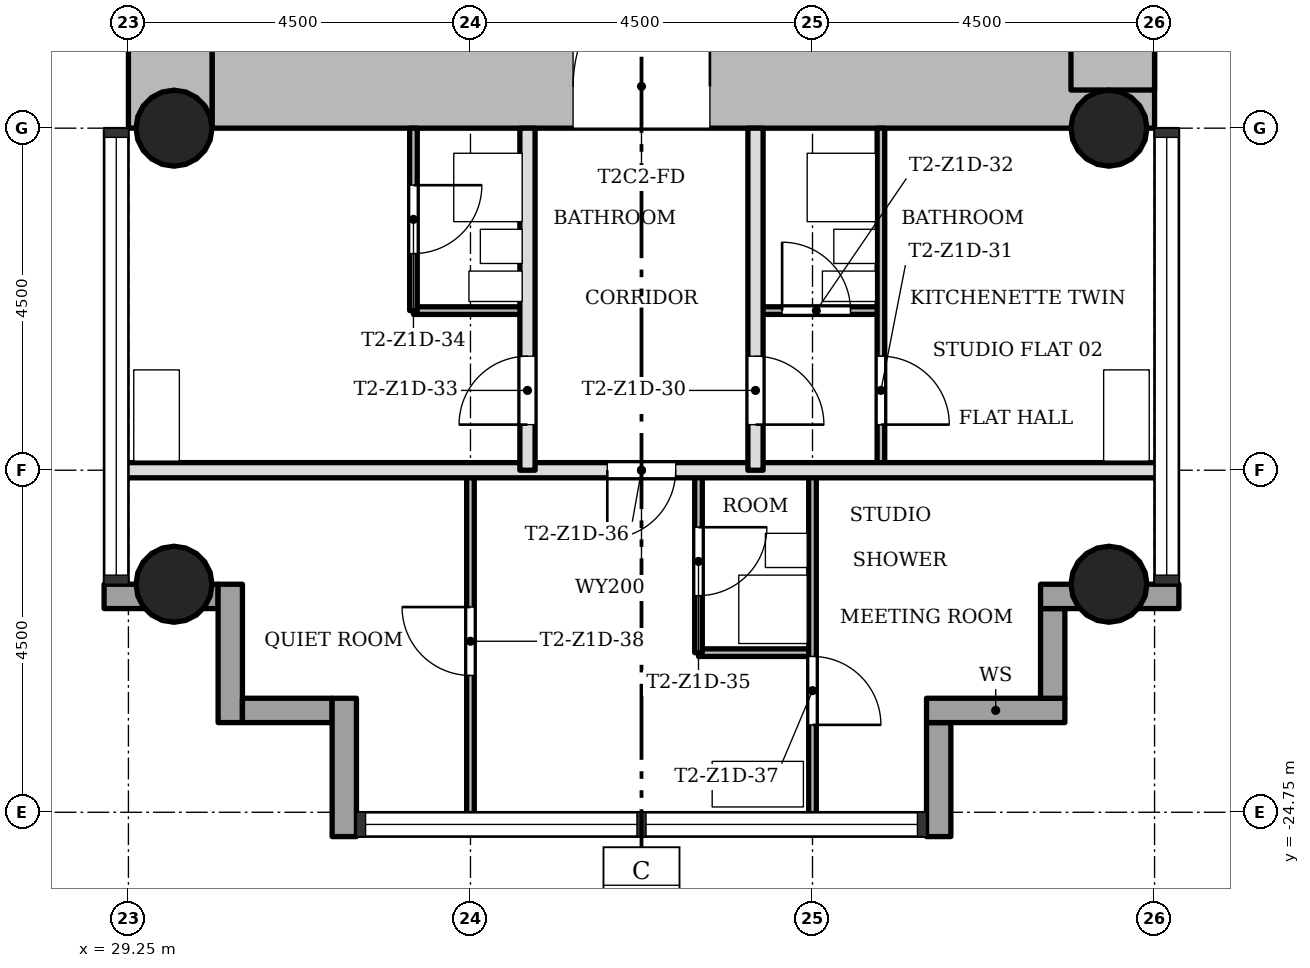
"""IFC4 building model, lengths in metres.
Left out: names, types, materials, properties, quantities, classifications, styles, units other than length and angle.
Written with IfcOpenShell. Run it as: python <this file> out.ifc"""

import sys

from ifc_helpers import new_model, si_unit, direction, frame, frame_2d, origin, origin_2d, place, context, subcontext, project, spatial, rectangle, hollow_circle, extrude, element, fill, save


model = new_model("IFC4")
c1 = context("Model", 3, precision=1e-05, world=origin(), true_north=direction((0.0, 1.0)))
c2 = subcontext(c1, "Body", "Model", "MODEL_VIEW")
j1 = project(units=[si_unit("LENGTHUNIT", "METRE"), si_unit("PLANEANGLEUNIT", "RADIAN")], contexts=[c1])
p1 = place(None, origin())
s1 = spatial("IfcSite", under=j1, at=p1, CompositionType="ELEMENT")
p2 = place(p1, origin())
s2 = spatial("IfcBuilding", under=s1, at=p2, CompositionType="ELEMENT")
p3 = place(p2, frame((0.0, 0.0, 55.1)))
s3 = spatial("IfcBuildingStorey", under=s2, at=p3, CompositionType="ELEMENT", Elevation=55.1)
p4 = place(p3, frame((30.35, -15.2, 0.0), z_axis=(0.0, 0.0, 1.0), x_axis=(1.0, 0.0, 0.0)))
e1 = element("IfcWall", 1, at=p4, inside=s3, PredefinedType="SHEAR", context=c2, shape_type="SweptSolid", body=[
    extrude(rectangle(XDim=12.4, YDim=1.1, at=frame_2d((6.2, 0.0))), origin(), (0.0, 0.0, 1.0), 3.4),
])
p5 = place(p4, frame((4.75, 0.0, 0.0)))
e2 = element("IfcOpeningElement", 2, at=p5, cuts=e1, PredefinedType="OPENING", context=c2, shape_type="SweptSolid", body=[
    extrude(rectangle(XDim=1.8, YDim=2.1, at=frame_2d((0.9, 1.05))), frame((0.0, 0.56, 0.0), z_axis=(0.0, -1.0, 0.0), x_axis=(1.0, 0.0, 0.0)), (0.0, 0.0, 1.0), 1.12),
])
p6 = place(p3, frame((42.2, -15.248, 0.0), z_axis=(0.0, 0.0, 1.0), x_axis=(0.0, 1.0, 0.0)))
e3 = element("IfcWall", 3, at=p6, inside=s3, PredefinedType="SHEAR", context=c2, shape_type="SweptSolid", body=[
    extrude(rectangle(XDim=8.596, YDim=1.1, at=frame_2d((4.298, 0.0))), origin(), (0.0, 0.0, 1.0), 3.4),
])
p7 = place(p3, frame((29.8, -7.85, 0.0), z_axis=(0.0, 0.0, 1.0), x_axis=(0.0, -1.0, 0.0)))
e4 = element("IfcWall", 4, at=p7, inside=s3, PredefinedType="SHEAR", context=c2, shape_type="SweptSolid", body=[
    extrude(rectangle(XDim=7.9, YDim=1.1, at=frame_2d((3.95, 0.0))), origin(), (0.0, 0.0, 1.0), 3.4),
])
for number, where, z_axis, x_axis in (
    (5, (42.15, -15.75, 0.0), (0.0, 0.0, 1.0), (1.0, 0.0, 0.0)),
    (6, (29.85, -15.75, 0.0), (0.0, 0.0, 1.0), (1.0, 0.0, 0.0)),
    (7, (42.15, -21.75, 0.0), (0.0, 0.0, 1.0), (1.0, 0.0, 0.0)),
    (8, (29.85, -21.75, 0.0), (0.0, 0.0, 1.0), (1.0, 0.0, 0.0)),
):
    element("IfcColumn", number, at=place(p3, frame(where, z_axis=z_axis, x_axis=x_axis)), inside=s3, PredefinedType="COLUMN", context=c2, shape_type="SweptSolid", body=[
        extrude(hollow_circle(Radius=0.5, WallThickness=0.036, at=origin_2d()), origin(), (0.0, 0.0, 1.0), 3.4),
    ])
p8 = place(p3, frame((39.91, -25.07, -0.3), z_axis=(0.0, 0.0, 1.0), x_axis=(0.0, 1.0, 0.0)))
e9 = element("IfcWall", 9, at=p8, inside=s3, PredefinedType="STANDARD", context=c2, shape_type="SweptSolid", body=[
    extrude(rectangle(XDim=1.5, YDim=0.32, at=frame_2d((0.75, 0.0))), origin(), (0.0, 0.0, 1.0), 3.4),
])
p9 = place(p3, frame((39.75, -23.41, -0.3), z_axis=(0.0, 0.0, 1.0), x_axis=(1.0, 0.0, 0.0)))
e10 = element("IfcWall", 10, at=p9, inside=s3, PredefinedType="STANDARD", context=c2, shape_type="SweptSolid", body=[
    extrude(rectangle(XDim=1.82, YDim=0.32, at=frame_2d((0.91, 0.0))), origin(), (0.0, 0.0, 1.0), 3.4),
])
p10 = place(p3, frame((41.41, -23.25, -0.3), z_axis=(0.0, 0.0, 1.0), x_axis=(0.0, 1.0, 0.0)))
e11 = element("IfcWall", 11, at=p10, inside=s3, PredefinedType="STANDARD", context=c2, shape_type="SweptSolid", body=[
    extrude(rectangle(XDim=1.18, YDim=0.32, at=frame_2d((0.59, 0.0))), origin(), (0.0, 0.0, 1.0), 3.4),
])
p11 = place(p3, frame((41.25, -21.91, -0.3), z_axis=(0.0, 0.0, 1.0), x_axis=(1.0, 0.0, 0.0)))
e12 = element("IfcWall", 12, at=p11, inside=s3, PredefinedType="STANDARD", context=c2, shape_type="SweptSolid", body=[
    extrude(rectangle(XDim=1.82, YDim=0.32, at=frame_2d((0.91, 0.0))), origin(), (0.0, 0.0, 1.0), 3.4),
])
p12 = place(p3, frame((28.93, -21.91, -0.3), z_axis=(0.0, 0.0, 1.0), x_axis=(1.0, 0.0, 0.0)))
e13 = element("IfcWall", 13, at=p12, inside=s3, PredefinedType="STANDARD", context=c2, shape_type="SweptSolid", body=[
    extrude(rectangle(XDim=1.5, YDim=0.32, at=frame_2d((0.75, 0.0))), origin(), (0.0, 0.0, 1.0), 3.4),
])
p13 = place(p3, frame((30.59, -21.75, -0.3), z_axis=(0.0, 0.0, 1.0), x_axis=(0.0, -1.0, 0.0)))
e14 = element("IfcWall", 14, at=p13, inside=s3, PredefinedType="STANDARD", context=c2, shape_type="SweptSolid", body=[
    extrude(rectangle(XDim=1.82, YDim=0.32, at=frame_2d((0.91, 0.0))), origin(), (0.0, 0.0, 1.0), 3.4),
])
p14 = place(p3, frame((30.75, -23.41, -0.3), z_axis=(0.0, 0.0, 1.0), x_axis=(1.0, 0.0, 0.0)))
e15 = element("IfcWall", 15, at=p14, inside=s3, PredefinedType="STANDARD", context=c2, shape_type="SweptSolid", body=[
    extrude(rectangle(XDim=1.18, YDim=0.32, at=frame_2d((0.59, 0.0))), origin(), (0.0, 0.0, 1.0), 3.4),
])
p15 = place(p3, frame((32.09, -23.25, -0.3), z_axis=(0.0, 0.0, 1.0), x_axis=(0.0, -1.0, 0.0)))
e16 = element("IfcWall", 16, at=p15, inside=s3, PredefinedType="STANDARD", context=c2, shape_type="SweptSolid", body=[
    extrude(rectangle(XDim=1.82, YDim=0.32, at=frame_2d((0.91, 0.0))), origin(), (0.0, 0.0, 1.0), 3.4),
])
p16 = place(p3, frame((38.25, -22.65, 0.0), z_axis=(0.0, 0.0, 1.0), x_axis=(-1.0, 0.0, 0.0)))
e17 = element("IfcWall", 17, at=p16, inside=s3, PredefinedType="PARTITIONING", context=c2, shape_type="SweptSolid", body=[
    extrude(rectangle(XDim=1.5, YDim=0.1, at=frame_2d((0.75, 0.0))), origin(), (0.0, 0.0, 1.0), 3.0),
])
p17 = place(p3, frame((42.85, -20.25, 0.0), z_axis=(0.0, 0.0, 1.0), x_axis=(-1.0, 0.0, 0.0)))
e18 = element("IfcWall", 18, at=p17, inside=s3, PredefinedType="SOLIDWALL", context=c2, shape_type="SweptSolid", body=[
    extrude(rectangle(XDim=13.7, YDim=0.2, at=frame_2d((6.85, 0.0))), origin(), (0.0, 0.0, 1.0), 3.0),
])
p18 = place(p17, frame((6.4, 0.0, 0.0)))
e19 = element("IfcOpeningElement", 19, at=p18, cuts=e18, PredefinedType="OPENING", context=c2, shape_type="SweptSolid", body=[
    extrude(rectangle(XDim=0.9, YDim=2.1, at=frame_2d((0.45, 1.05))), frame((0.0, 0.11, 0.0), z_axis=(0.0, -1.0, 0.0), x_axis=(1.0, 0.0, 0.0)), (0.0, 0.0, 1.0), 0.22),
])
p19 = place(p3, frame((39.15, -18.15, 0.0), z_axis=(0.0, 0.0, 1.0), x_axis=(-1.0, 0.0, 0.0)))
e20 = element("IfcWall", 20, at=p19, inside=s3, PredefinedType="PARTITIONING", context=c2, shape_type="SweptSolid", body=[
    extrude(rectangle(XDim=1.65, YDim=0.1, at=frame_2d((0.825, 0.0))), origin(), (0.0, 0.0, 1.0), 3.0),
])
p20 = place(p19, frame((0.4, 0.0, 0.0)))
e21 = element("IfcOpeningElement", 21, at=p20, cuts=e20, PredefinedType="OPENING", context=c2, shape_type="SweptSolid", body=[
    extrude(rectangle(XDim=0.9, YDim=2.1, at=frame_2d((0.45, 1.05))), frame((0.0, 0.06, 0.0), z_axis=(0.0, -1.0, 0.0), x_axis=(1.0, 0.0, 0.0)), (0.0, 0.0, 1.0), 0.12),
])
p21 = place(p3, frame((34.5, -18.15, 0.0), z_axis=(0.0, 0.0, 1.0), x_axis=(-1.0, 0.0, 0.0)))
e22 = element("IfcWall", 22, at=p21, inside=s3, PredefinedType="PARTITIONING", context=c2, shape_type="SweptSolid", body=[
    extrude(rectangle(XDim=1.5, YDim=0.1, at=frame_2d((0.75, 0.0))), origin(), (0.0, 0.0, 1.0), 3.0),
])
p22 = place(p3, frame((39.15, -20.25, 0.0), z_axis=(0.0, 0.0, 1.0), x_axis=(0.0, 1.0, 0.0)))
e23 = element("IfcWall", 23, at=p22, inside=s3, PredefinedType="PARTITIONING", context=c2, shape_type="SweptSolid", body=[
    extrude(rectangle(XDim=4.5, YDim=0.1, at=frame_2d((2.25, 0.0))), origin(), (0.0, 0.0, 1.0), 3.0),
])
p23 = place(p22, frame((0.6, 0.0, 0.0)))
e24 = element("IfcOpeningElement", 24, at=p23, cuts=e23, PredefinedType="OPENING", context=c2, shape_type="SweptSolid", body=[
    extrude(rectangle(XDim=0.9, YDim=2.1, at=frame_2d((0.45, 1.05))), frame((0.0, 0.06, 0.0), z_axis=(0.0, -1.0, 0.0), x_axis=(1.0, 0.0, 0.0)), (0.0, 0.0, 1.0), 0.12),
])
p24 = place(p3, frame((38.25, -24.85, 0.0), z_axis=(0.0, 0.0, 1.0), x_axis=(0.0, 1.0, 0.0)))
e25 = element("IfcWall", 25, at=p24, inside=s3, PredefinedType="PARTITIONING", context=c2, shape_type="SweptSolid", body=[
    extrude(rectangle(XDim=4.6, YDim=0.1, at=frame_2d((2.3, 0.0))), origin(), (0.0, 0.0, 1.0), 3.0),
])
p25 = place(p24, frame((1.25, 0.0, 0.0)))
e26 = element("IfcOpeningElement", 26, at=p25, cuts=e25, PredefinedType="OPENING", context=c2, shape_type="SweptSolid", body=[
    extrude(rectangle(XDim=0.9, YDim=2.1, at=frame_2d((0.45, 1.05))), frame((0.0, 0.06, 0.0), z_axis=(0.0, -1.0, 0.0), x_axis=(1.0, 0.0, 0.0)), (0.0, 0.0, 1.0), 0.12),
])
p26 = place(p3, frame((37.5, -20.25, 0.0), z_axis=(0.0, 0.0, 1.0), x_axis=(0.0, 1.0, 0.0)))
e27 = element("IfcWall", 27, at=p26, inside=s3, PredefinedType="SOLIDWALL", context=c2, shape_type="SweptSolid", body=[
    extrude(rectangle(XDim=4.5, YDim=0.2, at=frame_2d((2.25, 0.0))), origin(), (0.0, 0.0, 1.0), 3.0),
])
p27 = place(p26, frame((0.6, 0.0, 0.0)))
e28 = element("IfcOpeningElement", 28, at=p27, cuts=e27, PredefinedType="OPENING", context=c2, shape_type="SweptSolid", body=[
    extrude(rectangle(XDim=0.9, YDim=2.1, at=frame_2d((0.45, 1.05))), frame((0.0, 0.11, 0.0), z_axis=(0.0, -1.0, 0.0), x_axis=(1.0, 0.0, 0.0)), (0.0, 0.0, 1.0), 0.22),
])
p28 = place(p3, frame((36.75, -22.65, 0.0), z_axis=(0.0, 0.0, 1.0), x_axis=(0.0, 1.0, 0.0)))
e29 = element("IfcWall", 29, at=p28, inside=s3, PredefinedType="PARTITIONING", context=c2, shape_type="SweptSolid", body=[
    extrude(rectangle(XDim=2.4, YDim=0.1, at=frame_2d((1.2, 0.0))), origin(), (0.0, 0.0, 1.0), 3.0),
])
p29 = place(p28, frame((0.75, 0.0, 0.0)))
e30 = element("IfcOpeningElement", 30, at=p29, cuts=e29, PredefinedType="OPENING", context=c2, shape_type="SweptSolid", body=[
    extrude(rectangle(XDim=0.9, YDim=2.1, at=frame_2d((0.45, 1.05))), frame((0.0, 0.06, 0.0), z_axis=(0.0, -1.0, 0.0), x_axis=(1.0, 0.0, 0.0)), (0.0, 0.0, 1.0), 0.12),
])
p30 = place(p3, frame((34.5, -20.25, 0.0), z_axis=(0.0, 0.0, 1.0), x_axis=(0.0, 1.0, 0.0)))
e31 = element("IfcWall", 31, at=p30, inside=s3, PredefinedType="SOLIDWALL", context=c2, shape_type="SweptSolid", body=[
    extrude(rectangle(XDim=4.5, YDim=0.2, at=frame_2d((2.25, 0.0))), origin(), (0.0, 0.0, 1.0), 3.0),
])
p31 = place(p30, frame((0.6, 0.0, 0.0)))
e32 = element("IfcOpeningElement", 32, at=p31, cuts=e31, PredefinedType="OPENING", context=c2, shape_type="SweptSolid", body=[
    extrude(rectangle(XDim=0.9, YDim=2.1, at=frame_2d((0.45, 1.05))), frame((0.0, 0.11, 0.0), z_axis=(0.0, -1.0, 0.0), x_axis=(1.0, 0.0, 0.0)), (0.0, 0.0, 1.0), 0.22),
])
p32 = place(p3, frame((33.75, -24.85, 0.0), z_axis=(0.0, 0.0, 1.0), x_axis=(0.0, 1.0, 0.0)))
e33 = element("IfcWall", 33, at=p32, inside=s3, PredefinedType="PARTITIONING", context=c2, shape_type="SweptSolid", body=[
    extrude(rectangle(XDim=4.6, YDim=0.1, at=frame_2d((2.3, 0.0))), origin(), (0.0, 0.0, 1.0), 3.0),
])
p33 = place(p32, frame((1.9, 0.0, 0.0)))
e34 = element("IfcOpeningElement", 34, at=p33, cuts=e33, PredefinedType="OPENING", context=c2, shape_type="SweptSolid", body=[
    extrude(rectangle(XDim=0.9, YDim=2.1, at=frame_2d((0.45, 1.05))), frame((0.0, 0.06, 0.0), z_axis=(0.0, -1.0, 0.0), x_axis=(1.0, 0.0, 0.0)), (0.0, 0.0, 1.0), 0.12),
])
p34 = place(p3, frame((33.0, -18.15, 0.0), z_axis=(0.0, 0.0, 1.0), x_axis=(0.0, 1.0, 0.0)))
e35 = element("IfcWall", 35, at=p34, inside=s3, PredefinedType="PARTITIONING", context=c2, shape_type="SweptSolid", body=[
    extrude(rectangle(XDim=2.4, YDim=0.1, at=frame_2d((1.2, 0.0))), origin(), (0.0, 0.0, 1.0), 3.0),
])
p35 = place(p34, frame((0.75, 0.0, 0.0)))
e36 = element("IfcOpeningElement", 36, at=p35, cuts=e35, PredefinedType="OPENING", context=c2, shape_type="SweptSolid", body=[
    extrude(rectangle(XDim=0.9, YDim=2.1, at=frame_2d((0.45, 1.05))), frame((0.0, 0.06, 0.0), z_axis=(0.0, -1.0, 0.0), x_axis=(1.0, 0.0, 0.0)), (0.0, 0.0, 1.0), 0.12),
])
p36 = place(p27, origin())
e37 = element("IfcDoor", 37, at=p36, inside=s3, OperationType="SINGLE_SWING_LEFT", PredefinedType="DOOR", context=c2, shape_type="SweptSolid", body=[
    extrude(rectangle(XDim=0.9, YDim=2.1, at=frame_2d((0.45, 1.05))), frame((0.0, 0.025, 0.0), z_axis=(0.0, -1.0, 0.0), x_axis=(1.0, 0.0, 0.0)), (0.0, 0.0, 1.0), 0.05),
])
fill(e28, e37)
p37 = place(p23, origin())
e38 = element("IfcDoor", 38, at=p37, inside=s3, OperationType="SINGLE_SWING_LEFT", PredefinedType="DOOR", context=c2, shape_type="SweptSolid", body=[
    extrude(rectangle(XDim=0.9, YDim=2.1, at=frame_2d((0.45, 1.05))), frame((0.0, 0.025, 0.0), z_axis=(0.0, -1.0, 0.0), x_axis=(1.0, 0.0, 0.0)), (0.0, 0.0, 1.0), 0.05),
])
fill(e24, e38)
p38 = place(p20, origin())
e39 = element("IfcDoor", 39, at=p38, inside=s3, OperationType="SINGLE_SWING_RIGHT", PredefinedType="DOOR", context=c2, shape_type="SweptSolid", body=[
    extrude(rectangle(XDim=0.9, YDim=2.1, at=frame_2d((0.45, 1.05))), frame((0.0, 0.025, 0.0), z_axis=(0.0, -1.0, 0.0), x_axis=(1.0, 0.0, 0.0)), (0.0, 0.0, 1.0), 0.05),
])
fill(e21, e39)
p39 = place(p31, origin())
e40 = element("IfcDoor", 40, at=p39, inside=s3, OperationType="SINGLE_SWING_RIGHT", PredefinedType="DOOR", context=c2, shape_type="SweptSolid", body=[
    extrude(rectangle(XDim=0.9, YDim=2.1, at=frame_2d((0.45, 1.05))), frame((0.0, 0.025, 0.0), z_axis=(0.0, -1.0, 0.0), x_axis=(1.0, 0.0, 0.0)), (0.0, 0.0, 1.0), 0.05),
])
fill(e32, e40)
p40 = place(p35, origin())
e41 = element("IfcDoor", 41, at=p40, inside=s3, OperationType="SINGLE_SWING_RIGHT", PredefinedType="DOOR", context=c2, shape_type="SweptSolid", body=[
    extrude(rectangle(XDim=0.9, YDim=2.1, at=frame_2d((0.45, 1.05))), frame((0.0, 0.025, 0.0), z_axis=(0.0, -1.0, 0.0), x_axis=(1.0, 0.0, 0.0)), (0.0, 0.0, 1.0), 0.05),
])
fill(e36, e41)
p41 = place(p29, origin())
e42 = element("IfcDoor", 42, at=p41, inside=s3, OperationType="SINGLE_SWING_RIGHT", PredefinedType="DOOR", context=c2, shape_type="SweptSolid", body=[
    extrude(rectangle(XDim=0.9, YDim=2.1, at=frame_2d((0.45, 1.05))), frame((0.0, 0.025, 0.0), z_axis=(0.0, -1.0, 0.0), x_axis=(1.0, 0.0, 0.0)), (0.0, 0.0, 1.0), 0.05),
])
fill(e30, e42)
p42 = place(p18, origin())
e43 = element("IfcDoor", 43, at=p42, inside=s3, OperationType="SINGLE_SWING_LEFT", PredefinedType="DOOR", context=c2, shape_type="SweptSolid", body=[
    extrude(rectangle(XDim=0.9, YDim=2.1, at=frame_2d((0.45, 1.05))), frame((0.0, 0.025, 0.0), z_axis=(0.0, -1.0, 0.0), x_axis=(1.0, 0.0, 0.0)), (0.0, 0.0, 1.0), 0.05),
])
fill(e19, e43)
p43 = place(p25, origin())
e44 = element("IfcDoor", 44, at=p43, inside=s3, OperationType="SINGLE_SWING_LEFT", PredefinedType="DOOR", context=c2, shape_type="SweptSolid", body=[
    extrude(rectangle(XDim=0.9, YDim=2.1, at=frame_2d((0.45, 1.05))), frame((0.0, 0.025, 0.0), z_axis=(0.0, -1.0, 0.0), x_axis=(1.0, 0.0, 0.0)), (0.0, 0.0, 1.0), 0.05),
])
fill(e26, e44)
p44 = place(p33, origin())
e45 = element("IfcDoor", 45, at=p44, inside=s3, OperationType="SINGLE_SWING_LEFT", PredefinedType="DOOR", context=c2, shape_type="SweptSolid", body=[
    extrude(rectangle(XDim=0.9, YDim=2.1, at=frame_2d((0.45, 1.05))), frame((0.0, 0.025, 0.0), z_axis=(0.0, -1.0, 0.0), x_axis=(1.0, 0.0, 0.0)), (0.0, 0.0, 1.0), 0.05),
])
fill(e34, e45)
p45 = place(p5, origin())
e46 = element("IfcDoor", 46, at=p45, inside=s3, OperationType="SINGLE_SWING_LEFT", PredefinedType="DOOR", context=c2, shape_type="SweptSolid", body=[
    extrude(rectangle(XDim=1.8, YDim=2.1, at=frame_2d((0.9, 1.05))), frame((0.0, 0.025, 0.0), z_axis=(0.0, -1.0, 0.0), x_axis=(1.0, 0.0, 0.0)), (0.0, 0.0, 1.0), 0.05),
])
fill(e2, e46)
save(model, sys.argv[1])
